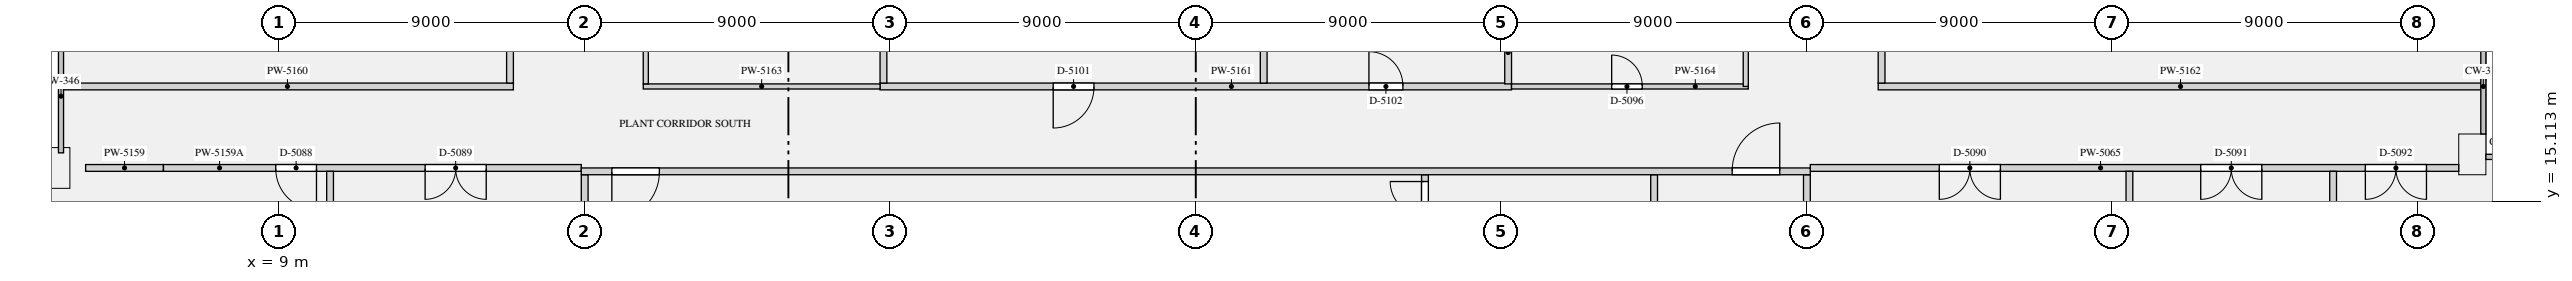
"""IFC4 building model, lengths in metres.
Left out: names, types, materials, properties, quantities, classifications, styles, units other than length and angle.
Written with IfcOpenShell. Run it as: python <this file> out.ifc"""

import sys

from ifc_helpers import new_model, si_unit, direction, frame, frame_2d, origin, origin_2d, place, context, subcontext, project, spatial, rectangle, extrude, element, fill, save


model = new_model("IFC4")
c1 = context("Model", 3, precision=1e-05, world=origin(), true_north=direction((0.0, 1.0)))
c2 = subcontext(c1, "Body", "Model", "MODEL_VIEW")
j1 = project(units=[si_unit("LENGTHUNIT", "METRE"), si_unit("PLANEANGLEUNIT", "RADIAN")], contexts=[c1])
p1 = place(None, origin())
s1 = spatial("IfcSite", under=j1, at=p1, CompositionType="ELEMENT")
p2 = place(p1, origin())
s2 = spatial("IfcBuilding", under=s1, at=p2, CompositionType="ELEMENT")
p3 = place(p2, frame((0.0, 0.0, 73.05)))
s3 = spatial("IfcBuildingStorey", under=s2, at=p3, CompositionType="ELEMENT", Elevation=73.05)
p4 = place(p3, frame((73.6, 16.5, 0.0), z_axis=(0.0, 0.0, 1.0), x_axis=(0.0, 1.0, 0.0)))
e1 = element("IfcColumn", 1, at=p4, inside=s3, PredefinedType="USERDEFINED", context=c2, shape_type="SweptSolid", body=[
    extrude(rectangle(XDim=1.2, YDim=0.8, at=origin_2d()), origin(), (0.0, 0.0, 1.0), 4.2),
])
p5 = place(p3, frame((2.436, 16.1, -0.06), z_axis=(0.731043450317, 0.004056748068, 0.682318852549), x_axis=(-0.682308347041, -0.00378630445, 0.7310547062)))
e2 = element("IfcColumn", 2, at=p5, inside=s3, PredefinedType="USERDEFINED", context=c2, shape_type="SweptSolid", body=[
    extrude(rectangle(XDim=1.2, YDim=0.8, at=origin_2d()), origin(), (0.0, 0.0, 1.0), 5.597),
])
p6 = place(p3, frame((0.18, 15.897, -0.206), z_axis=(0.729132704509, 0.008165571295, 0.684323624217), x_axis=(-0.011198317176, 0.99993729688, 0.0)))
e3 = element("IfcColumn", 3, at=p6, inside=s3, PredefinedType="USERDEFINED", context=c2, shape_type="SweptSolid", body=[
    extrude(rectangle(XDim=1.2, YDim=0.8, at=origin_2d()), origin(), (0.0, 0.0, 1.0), 6.01),
])
p7 = place(p3, frame((18.0, 12.5, 0.0), z_axis=(0.0, 0.0, 1.0), x_axis=(0.0, 1.0, 0.0)))
e4 = element("IfcWall", 4, at=p7, inside=s3, PredefinedType="PARTITIONING", context=c2, shape_type="SweptSolid", body=[
    extrude(rectangle(XDim=3.4, YDim=0.2, at=frame_2d((1.7, 0.0))), origin(), (0.0, 0.0, 1.0), 3.7),
])
p8 = place(p3, frame((42.75, 12.5, 0.0), z_axis=(0.0, 0.0, 1.0), x_axis=(0.0, 1.0, 0.0)))
e5 = element("IfcWall", 5, at=p8, inside=s3, PredefinedType="PARTITIONING", context=c2, shape_type="SweptSolid", body=[
    extrude(rectangle(XDim=3.4, YDim=0.2, at=frame_2d((1.7, 0.0))), origin(), (0.0, 0.0, 1.0), 3.7),
])
p9 = place(p8, frame((2.2, 0.0, 0.0)))
e6 = element("IfcOpeningElement", 6, at=p9, cuts=e5, PredefinedType="OPENING", context=c2, shape_type="SweptSolid", body=[
    extrude(rectangle(XDim=1.0, YDim=2.1, at=frame_2d((0.5, 1.05))), frame((0.0, 0.11, 0.0), z_axis=(0.0, -1.0, 0.0), x_axis=(1.0, 0.0, 0.0)), (0.0, 0.0, 1.0), 0.22),
])
p10 = place(p3, frame((49.5, 12.5, 0.0), z_axis=(0.0, 0.0, 1.0), x_axis=(0.0, 1.0, 0.0)))
e7 = element("IfcWall", 7, at=p10, inside=s3, PredefinedType="PARTITIONING", context=c2, shape_type="SweptSolid", body=[
    extrude(rectangle(XDim=3.4, YDim=0.2, at=frame_2d((1.7, 0.0))), origin(), (0.0, 0.0, 1.0), 3.7),
])
p11 = place(p10, frame((1.15, 0.0, 0.0)))
e8 = element("IfcOpeningElement", 8, at=p11, cuts=e7, PredefinedType="OPENING", context=c2, shape_type="SweptSolid", body=[
    extrude(rectangle(XDim=1.1, YDim=2.1, at=frame_2d((0.55, 1.05))), frame((0.0, 0.11, 0.0), z_axis=(0.0, -1.0, 0.0), x_axis=(1.0, 0.0, 0.0)), (0.0, 0.0, 1.0), 0.22),
])
p12 = place(p3, frame((54.0, 12.5, 0.0), z_axis=(0.0, 0.0, 1.0), x_axis=(0.0, 1.0, 0.0)))
e9 = element("IfcWall", 9, at=p12, inside=s3, PredefinedType="PARTITIONING", context=c2, shape_type="SweptSolid", body=[
    extrude(rectangle(XDim=3.4, YDim=0.2, at=frame_2d((1.7, 0.0))), origin(), (0.0, 0.0, 1.0), 3.7),
])
p13 = place(p3, frame((17.9, 16.0, 0.0), z_axis=(0.0, 0.0, 1.0), x_axis=(1.0, 0.0, 0.0)))
e10 = element("IfcWall", 10, at=p13, inside=s3, PredefinedType="PARTITIONING", context=c2, shape_type="SweptSolid", body=[
    extrude(rectangle(XDim=36.2, YDim=0.2, at=frame_2d((18.1, 0.0))), origin(), (0.0, 0.0, 1.0), 3.7),
])
p14 = place(p13, frame((0.9, 0.0, 0.0)))
e11 = element("IfcOpeningElement", 11, at=p14, cuts=e10, PredefinedType="OPENING", context=c2, shape_type="SweptSolid", body=[
    extrude(rectangle(XDim=1.4, YDim=2.1, at=frame_2d((0.7, 1.05))), frame((0.0, 0.11, 0.0), z_axis=(0.0, -1.0, 0.0), x_axis=(1.0, 0.0, 0.0)), (0.0, 0.0, 1.0), 0.22),
])
p15 = place(p13, frame((33.9, 0.0, 0.0)))
e12 = element("IfcOpeningElement", 12, at=p15, cuts=e10, PredefinedType="OPENING", context=c2, shape_type="SweptSolid", body=[
    extrude(rectangle(XDim=1.4, YDim=2.1, at=frame_2d((0.7, 1.05))), frame((0.0, 0.11, 0.0), z_axis=(0.0, -1.0, 0.0), x_axis=(1.0, 0.0, 0.0)), (0.0, 0.0, 1.0), 0.22),
])
p16 = place(p3, frame((3.3, 16.1, 0.0), z_axis=(0.0, 0.0, 1.0), x_axis=(1.0, 0.0, 0.0)))
e13 = element("IfcWall", 13, at=p16, inside=s3, PredefinedType="PARTITIONING", context=c2, shape_type="SweptSolid", body=[
    extrude(rectangle(XDim=2.292, YDim=0.2, at=frame_2d((1.146, 0.0))), origin(), (0.0, 0.0, 1.0), 2.8),
])
p17 = place(p3, frame((5.592, 16.1, 0.0), z_axis=(0.0, 0.0, 1.0), x_axis=(1.0, 0.0, 0.0)))
e14 = element("IfcWall", 14, at=p17, inside=s3, PredefinedType="PARTITIONING", context=c2, shape_type="SweptSolid", body=[
    extrude(rectangle(XDim=12.308, YDim=0.2, at=frame_2d((6.154, 0.0))), origin(), (0.0, 0.0, 1.0), 3.7),
])
p18 = place(p17, frame((3.308, 0.0, 0.0)))
e15 = element("IfcOpeningElement", 15, at=p18, cuts=e14, PredefinedType="OPENING", context=c2, shape_type="SweptSolid", body=[
    extrude(rectangle(XDim=1.2, YDim=2.1, at=frame_2d((0.6, 1.05))), frame((0.0, 0.11, 0.0), z_axis=(0.0, -1.0, 0.0), x_axis=(1.0, 0.0, 0.0)), (0.0, 0.0, 1.0), 0.22),
])
p19 = place(p17, frame((7.708, 0.0, 0.0)))
e16 = element("IfcOpeningElement", 16, at=p19, cuts=e14, PredefinedType="OPENING", context=c2, shape_type="SweptSolid", body=[
    extrude(rectangle(XDim=1.8, YDim=2.1, at=frame_2d((0.9, 1.05))), frame((0.0, 0.11, 0.0), z_axis=(0.0, -1.0, 0.0), x_axis=(1.0, 0.0, 0.0)), (0.0, 0.0, 1.0), 0.22),
])
p20 = place(p3, frame((54.1, 16.1, 0.0), z_axis=(0.0, 0.0, 1.0), x_axis=(1.0, 0.0, 0.0)))
e17 = element("IfcWall", 17, at=p20, inside=s3, PredefinedType="PARTITIONING", context=c2, shape_type="SweptSolid", body=[
    extrude(rectangle(XDim=19.1, YDim=0.2, at=frame_2d((9.55, 0.0))), origin(), (0.0, 0.0, 1.0), 3.7),
])
p21 = place(p20, frame((3.8, 0.0, 0.0)))
e18 = element("IfcOpeningElement", 18, at=p21, cuts=e17, PredefinedType="OPENING", context=c2, shape_type="SweptSolid", body=[
    extrude(rectangle(XDim=1.8, YDim=2.1, at=frame_2d((0.9, 1.05))), frame((0.0, 0.11, 0.0), z_axis=(0.0, -1.0, 0.0), x_axis=(1.0, 0.0, 0.0)), (0.0, 0.0, 1.0), 0.22),
])
p22 = place(p20, frame((11.5, 0.0, 0.0)))
e19 = element("IfcOpeningElement", 19, at=p22, cuts=e17, PredefinedType="OPENING", context=c2, shape_type="SweptSolid", body=[
    extrude(rectangle(XDim=1.8, YDim=2.1, at=frame_2d((0.9, 1.05))), frame((0.0, 0.11, 0.0), z_axis=(0.0, -1.0, 0.0), x_axis=(1.0, 0.0, 0.0)), (0.0, 0.0, 1.0), 0.22),
])
p23 = place(p20, frame((16.35, 0.0, 0.0)))
e20 = element("IfcOpeningElement", 20, at=p23, cuts=e17, PredefinedType="OPENING", context=c2, shape_type="SweptSolid", body=[
    extrude(rectangle(XDim=1.8, YDim=2.1, at=frame_2d((0.9, 1.05))), frame((0.0, 0.11, 0.0), z_axis=(0.0, -1.0, 0.0), x_axis=(1.0, 0.0, 0.0)), (0.0, 0.0, 1.0), 0.22),
])
p24 = place(p3, frame((2.59, 18.5, 0.0), z_axis=(0.0, 0.0, 1.0), x_axis=(1.0, 0.0, 0.0)))
e21 = element("IfcWall", 21, at=p24, inside=s3, PredefinedType="PARTITIONING", context=c2, shape_type="SweptSolid", body=[
    extrude(rectangle(XDim=13.31, YDim=0.2, at=frame_2d((6.655, 0.0))), origin(), (0.0, 0.0, 1.0), 3.7),
])
p25 = place(p3, frame((26.7, 18.5, 0.0), z_axis=(0.0, 0.0, 1.0), x_axis=(1.0, 0.0, 0.0)))
e22 = element("IfcWall", 22, at=p25, inside=s3, PredefinedType="PARTITIONING", context=c2, shape_type="SweptSolid", body=[
    extrude(rectangle(XDim=18.6, YDim=0.2, at=frame_2d((9.3, 0.0))), origin(), (0.0, 0.0, 1.0), 3.7),
])
p26 = place(p25, frame((5.1, 0.0, 0.0)))
e23 = element("IfcOpeningElement", 23, at=p26, cuts=e22, PredefinedType="OPENING", context=c2, shape_type="SweptSolid", body=[
    extrude(rectangle(XDim=1.2, YDim=2.1, at=frame_2d((0.6, 1.05))), frame((0.0, 0.11, 0.0), z_axis=(0.0, -1.0, 0.0), x_axis=(1.0, 0.0, 0.0)), (0.0, 0.0, 1.0), 0.22),
])
p27 = place(p25, frame((14.4, 0.0, 0.0)))
e24 = element("IfcOpeningElement", 24, at=p27, cuts=e22, PredefinedType="OPENING", context=c2, shape_type="SweptSolid", body=[
    extrude(rectangle(XDim=1.0, YDim=2.1, at=frame_2d((0.5, 1.05))), frame((0.0, 0.11, 0.0), z_axis=(0.0, -1.0, 0.0), x_axis=(1.0, 0.0, 0.0)), (0.0, 0.0, 1.0), 0.22),
])
p28 = place(p3, frame((56.1, 18.5, 0.0), z_axis=(0.0, 0.0, 1.0), x_axis=(1.0, 0.0, 0.0)))
e25 = element("IfcWall", 25, at=p28, inside=s3, PredefinedType="PARTITIONING", context=c2, shape_type="SweptSolid", body=[
    extrude(rectangle(XDim=17.81, YDim=0.2, at=frame_2d((8.905, 0.0))), origin(), (0.0, 0.0, 1.0), 3.7),
])
p29 = place(p3, frame((19.725, 18.5, 0.0), z_axis=(0.0, 0.0, 1.0), x_axis=(1.0, 0.0, 0.0)))
e26 = element("IfcWall", 26, at=p29, inside=s3, PredefinedType="PARTITIONING", context=c2, shape_type="SweptSolid", body=[
    extrude(rectangle(XDim=6.975, YDim=0.15, at=frame_2d((3.487, 0.0))), origin(), (0.0, 0.0, 1.0), 3.7),
])
p30 = place(p3, frame((45.3, 18.5, 0.0), z_axis=(0.0, 0.0, 1.0), x_axis=(1.0, 0.0, 0.0)))
e27 = element("IfcWall", 27, at=p30, inside=s3, PredefinedType="PARTITIONING", context=c2, shape_type="SweptSolid", body=[
    extrude(rectangle(XDim=6.975, YDim=0.15, at=frame_2d((3.487, 0.0))), origin(), (0.0, 0.0, 1.0), 3.7),
])
p31 = place(p30, frame((2.95, 0.0, 0.0)))
e28 = element("IfcOpeningElement", 28, at=p31, cuts=e27, PredefinedType="OPENING", context=c2, shape_type="SweptSolid", body=[
    extrude(rectangle(XDim=0.9, YDim=2.1, at=frame_2d((0.45, 1.05))), frame((0.0, 0.085, 0.0), z_axis=(0.0, -1.0, 0.0), x_axis=(1.0, 0.0, 0.0)), (0.0, 0.0, 1.0), 0.17),
])
p32 = place(p3, frame((10.5, 0.09, 0.0), z_axis=(0.0, 0.0, 1.0), x_axis=(0.0, 1.0, 0.0)))
e29 = element("IfcWall", 29, at=p32, inside=s3, PredefinedType="PARTITIONING", context=c2, shape_type="SweptSolid", body=[
    extrude(rectangle(XDim=15.91, YDim=0.2, at=frame_2d((7.955, 0.0))), origin(), (0.0, 0.0, 1.0), 3.7),
])
p33 = place(p3, frame((63.5, 0.8, 0.0), z_axis=(0.0, 0.0, 1.0), x_axis=(0.0, 1.0, 0.0)))
e30 = element("IfcWall", 30, at=p33, inside=s3, PredefinedType="PARTITIONING", context=c2, shape_type="SweptSolid", body=[
    extrude(rectangle(XDim=15.2, YDim=0.2, at=frame_2d((7.6, 0.0))), origin(), (0.0, 0.0, 1.0), 3.7),
])
p34 = place(p3, frame((69.5, 0.09, 0.0), z_axis=(0.0, 0.0, 1.0), x_axis=(0.0, 1.0, 0.0)))
e31 = element("IfcWall", 31, at=p34, inside=s3, PredefinedType="PARTITIONING", context=c2, shape_type="SweptSolid", body=[
    extrude(rectangle(XDim=15.91, YDim=0.2, at=frame_2d((7.955, 0.0))), origin(), (0.0, 0.0, 1.0), 3.7),
])
p35 = place(p3, frame((52.2, 18.5, 0.0), z_axis=(0.0, 0.0, 1.0), x_axis=(0.0, 1.0, 0.0)))
e32 = element("IfcWall", 32, at=p35, inside=s3, PredefinedType="PARTITIONING", context=c2, shape_type="SweptSolid", body=[
    extrude(rectangle(XDim=4.5, YDim=0.15, at=frame_2d((2.25, 0.0))), origin(), (0.0, 0.0, 1.0), 3.7),
])
p36 = place(p35, frame((2.8, 0.0, 0.0)))
e33 = element("IfcOpeningElement", 33, at=p36, cuts=e32, PredefinedType="OPENING", context=c2, shape_type="SweptSolid", body=[
    extrude(rectangle(XDim=0.9, YDim=2.1, at=frame_2d((0.45, 1.05))), frame((0.0, 0.085, 0.0), z_axis=(0.0, -1.0, 0.0), x_axis=(1.0, 0.0, 0.0)), (0.0, 0.0, 1.0), 0.17),
])
p37 = place(p3, frame((19.8, 18.575, 0.0), z_axis=(0.0, 0.0, 1.0), x_axis=(0.0, 1.0, 0.0)))
e34 = element("IfcWall", 34, at=p37, inside=s3, PredefinedType="PARTITIONING", context=c2, shape_type="SweptSolid", body=[
    extrude(rectangle(XDim=7.35, YDim=0.15, at=frame_2d((3.675, 0.0))), origin(), (0.0, 0.0, 1.0), 3.7),
])
p38 = place(p37, frame((3.225, 0.0, 0.0)))
e35 = element("IfcOpeningElement", 35, at=p38, cuts=e34, PredefinedType="OPENING", context=c2, shape_type="SweptSolid", body=[
    extrude(rectangle(XDim=0.9, YDim=2.1, at=frame_2d((0.45, 1.05))), frame((0.0, 0.085, 0.0), z_axis=(0.0, -1.0, 0.0), x_axis=(1.0, 0.0, 0.0)), (0.0, 0.0, 1.0), 0.17),
])
p39 = place(p3, frame((45.2, 18.575, 0.0), z_axis=(0.0, 0.0, 1.0), x_axis=(0.0, 1.0, 0.0)))
e36 = element("IfcWall", 36, at=p39, inside=s3, PredefinedType="PARTITIONING", context=c2, shape_type="SweptSolid", body=[
    extrude(rectangle(XDim=1.85, YDim=0.2, at=frame_2d((0.925, 0.0))), origin(), (0.0, 0.0, 1.0), 3.7),
])
p40 = place(p3, frame((15.8, 18.6, 0.0), z_axis=(0.0, 0.0, 1.0), x_axis=(0.0, 1.0, 0.0)))
e37 = element("IfcWall", 37, at=p40, inside=s3, PredefinedType="PARTITIONING", context=c2, shape_type="SweptSolid", body=[
    extrude(rectangle(XDim=4.3, YDim=0.2, at=frame_2d((2.15, 0.0))), origin(), (0.0, 0.0, 1.0), 3.7),
])
p41 = place(p3, frame((26.8, 18.6, 0.0), z_axis=(0.0, 0.0, 1.0), x_axis=(0.0, 1.0, 0.0)))
e38 = element("IfcWall", 38, at=p41, inside=s3, PredefinedType="PARTITIONING", context=c2, shape_type="SweptSolid", body=[
    extrude(rectangle(XDim=5.1, YDim=0.2, at=frame_2d((2.55, 0.0))), origin(), (0.0, 0.0, 1.0), 3.7),
])
p42 = place(p3, frame((38.0, 18.6, 0.0), z_axis=(0.0, 0.0, 1.0), x_axis=(0.0, 1.0, 0.0)))
e39 = element("IfcWall", 39, at=p42, inside=s3, PredefinedType="PARTITIONING", context=c2, shape_type="SweptSolid", body=[
    extrude(rectangle(XDim=5.304, YDim=0.2, at=frame_2d((2.652, 0.0))), origin(), (0.0, 0.0, 1.0), 3.7),
])
p43 = place(p3, frame((56.2, 18.6, 0.0), z_axis=(0.0, 0.0, 1.0), x_axis=(0.0, 1.0, 0.0)))
e40 = element("IfcWall", 40, at=p43, inside=s3, PredefinedType="PARTITIONING", context=c2, shape_type="SweptSolid", body=[
    extrude(rectangle(XDim=4.3, YDim=0.2, at=frame_2d((2.15, 0.0))), origin(), (0.0, 0.0, 1.0), 3.7),
])
p44 = place(p9, origin())
e41 = element("IfcDoor", 41, at=p44, inside=s3, OperationType="SINGLE_SWING_RIGHT", PredefinedType="DOOR", context=c2, shape_type="SweptSolid", body=[
    extrude(rectangle(XDim=1.0, YDim=2.1, at=frame_2d((0.5, 1.05))), frame((0.0, 0.025, 0.0), z_axis=(0.0, -1.0, 0.0), x_axis=(1.0, 0.0, 0.0)), (0.0, 0.0, 1.0), 0.05),
])
fill(e6, e41)
p45 = place(p14, frame((1.4, 0.0, 0.0), z_axis=(0.0, 0.0, 1.0), x_axis=(-1.0, 0.0, 0.0)))
e42 = element("IfcDoor", 42, at=p45, inside=s3, OperationType="SINGLE_SWING_RIGHT", PredefinedType="DOOR", context=c2, shape_type="SweptSolid", body=[
    extrude(rectangle(XDim=1.4, YDim=2.1, at=frame_2d((0.7, 1.05))), frame((0.0, 0.025, 0.0), z_axis=(0.0, -1.0, 0.0), x_axis=(1.0, 0.0, 0.0)), (0.0, 0.0, 1.0), 0.05),
])
fill(e11, e42)
p46 = place(p15, origin())
e43 = element("IfcDoor", 43, at=p46, inside=s3, OperationType="SINGLE_SWING_RIGHT", PredefinedType="DOOR", context=c2, shape_type="SweptSolid", body=[
    extrude(rectangle(XDim=1.4, YDim=2.1, at=frame_2d((0.7, 1.05))), frame((0.0, 0.025, 0.0), z_axis=(0.0, -1.0, 0.0), x_axis=(1.0, 0.0, 0.0)), (0.0, 0.0, 1.0), 0.05),
])
fill(e12, e43)
p47 = place(p18, frame((1.2, 0.0, 0.0), z_axis=(0.0, 0.0, 1.0), x_axis=(-1.0, 0.0, 0.0)))
e44 = element("IfcDoor", 44, at=p47, inside=s3, OperationType="SINGLE_SWING_LEFT", PredefinedType="DOOR", context=c2, shape_type="SweptSolid", body=[
    extrude(rectangle(XDim=1.2, YDim=2.1, at=frame_2d((0.6, 1.05))), frame((0.0, 0.025, 0.0), z_axis=(0.0, -1.0, 0.0), x_axis=(1.0, 0.0, 0.0)), (0.0, 0.0, 1.0), 0.05),
])
fill(e15, e44)
p48 = place(p19, frame((1.8, 0.0, 0.0), z_axis=(0.0, 0.0, 1.0), x_axis=(-1.0, 0.0, 0.0)))
e45 = element("IfcDoor", 45, at=p48, inside=s3, OperationType="DOUBLE_DOOR_SINGLE_SWING", PredefinedType="DOOR", context=c2, shape_type="SweptSolid", body=[
    extrude(rectangle(XDim=1.8, YDim=2.1, at=frame_2d((0.9, 1.05))), frame((0.0, 0.025, 0.0), z_axis=(0.0, -1.0, 0.0), x_axis=(1.0, 0.0, 0.0)), (0.0, 0.0, 1.0), 0.05),
])
fill(e16, e45)
p49 = place(p21, frame((1.8, 0.0, 0.0), z_axis=(0.0, 0.0, 1.0), x_axis=(-1.0, 0.0, 0.0)))
e46 = element("IfcDoor", 46, at=p49, inside=s3, OperationType="DOUBLE_DOOR_SINGLE_SWING", PredefinedType="DOOR", context=c2, shape_type="SweptSolid", body=[
    extrude(rectangle(XDim=1.8, YDim=2.1, at=frame_2d((0.9, 1.05))), frame((0.0, 0.025, 0.0), z_axis=(0.0, -1.0, 0.0), x_axis=(1.0, 0.0, 0.0)), (0.0, 0.0, 1.0), 0.05),
])
fill(e18, e46)
p50 = place(p22, frame((1.8, 0.0, 0.0), z_axis=(0.0, 0.0, 1.0), x_axis=(-1.0, 0.0, 0.0)))
e47 = element("IfcDoor", 47, at=p50, inside=s3, OperationType="DOUBLE_DOOR_SINGLE_SWING", PredefinedType="DOOR", context=c2, shape_type="SweptSolid", body=[
    extrude(rectangle(XDim=1.8, YDim=2.1, at=frame_2d((0.9, 1.05))), frame((0.0, 0.025, 0.0), z_axis=(0.0, -1.0, 0.0), x_axis=(1.0, 0.0, 0.0)), (0.0, 0.0, 1.0), 0.05),
])
fill(e19, e47)
p51 = place(p23, frame((1.8, 0.0, 0.0), z_axis=(0.0, 0.0, 1.0), x_axis=(-1.0, 0.0, 0.0)))
e48 = element("IfcDoor", 48, at=p51, inside=s3, OperationType="DOUBLE_DOOR_SINGLE_SWING", PredefinedType="DOOR", context=c2, shape_type="SweptSolid", body=[
    extrude(rectangle(XDim=1.8, YDim=2.1, at=frame_2d((0.9, 1.05))), frame((0.0, 0.025, 0.0), z_axis=(0.0, -1.0, 0.0), x_axis=(1.0, 0.0, 0.0)), (0.0, 0.0, 1.0), 0.05),
])
fill(e20, e48)
p52 = place(p31, origin())
e49 = element("IfcDoor", 49, at=p52, inside=s3, OperationType="SINGLE_SWING_LEFT", PredefinedType="DOOR", context=c2, shape_type="SweptSolid", body=[
    extrude(rectangle(XDim=0.9, YDim=2.1, at=frame_2d((0.45, 1.05))), frame((0.0, 0.025, 0.0), z_axis=(0.0, -1.0, 0.0), x_axis=(1.0, 0.0, 0.0)), (0.0, 0.0, 1.0), 0.05),
])
fill(e28, e49)
p53 = place(p26, frame((1.2, 0.0, 0.0), z_axis=(0.0, 0.0, 1.0), x_axis=(-1.0, 0.0, 0.0)))
e50 = element("IfcDoor", 50, at=p53, inside=s3, OperationType="SINGLE_SWING_RIGHT", PredefinedType="DOOR", context=c2, shape_type="SweptSolid", body=[
    extrude(rectangle(XDim=1.2, YDim=2.1, at=frame_2d((0.6, 1.05))), frame((0.0, 0.025, 0.0), z_axis=(0.0, -1.0, 0.0), x_axis=(1.0, 0.0, 0.0)), (0.0, 0.0, 1.0), 0.05),
])
fill(e23, e50)
p54 = place(p27, origin())
e51 = element("IfcDoor", 51, at=p54, inside=s3, OperationType="SINGLE_SWING_LEFT", PredefinedType="DOOR", context=c2, shape_type="SweptSolid", body=[
    extrude(rectangle(XDim=1.0, YDim=2.1, at=frame_2d((0.5, 1.05))), frame((0.0, 0.025, 0.0), z_axis=(0.0, -1.0, 0.0), x_axis=(1.0, 0.0, 0.0)), (0.0, 0.0, 1.0), 0.05),
])
fill(e24, e51)
save(model, sys.argv[1])
